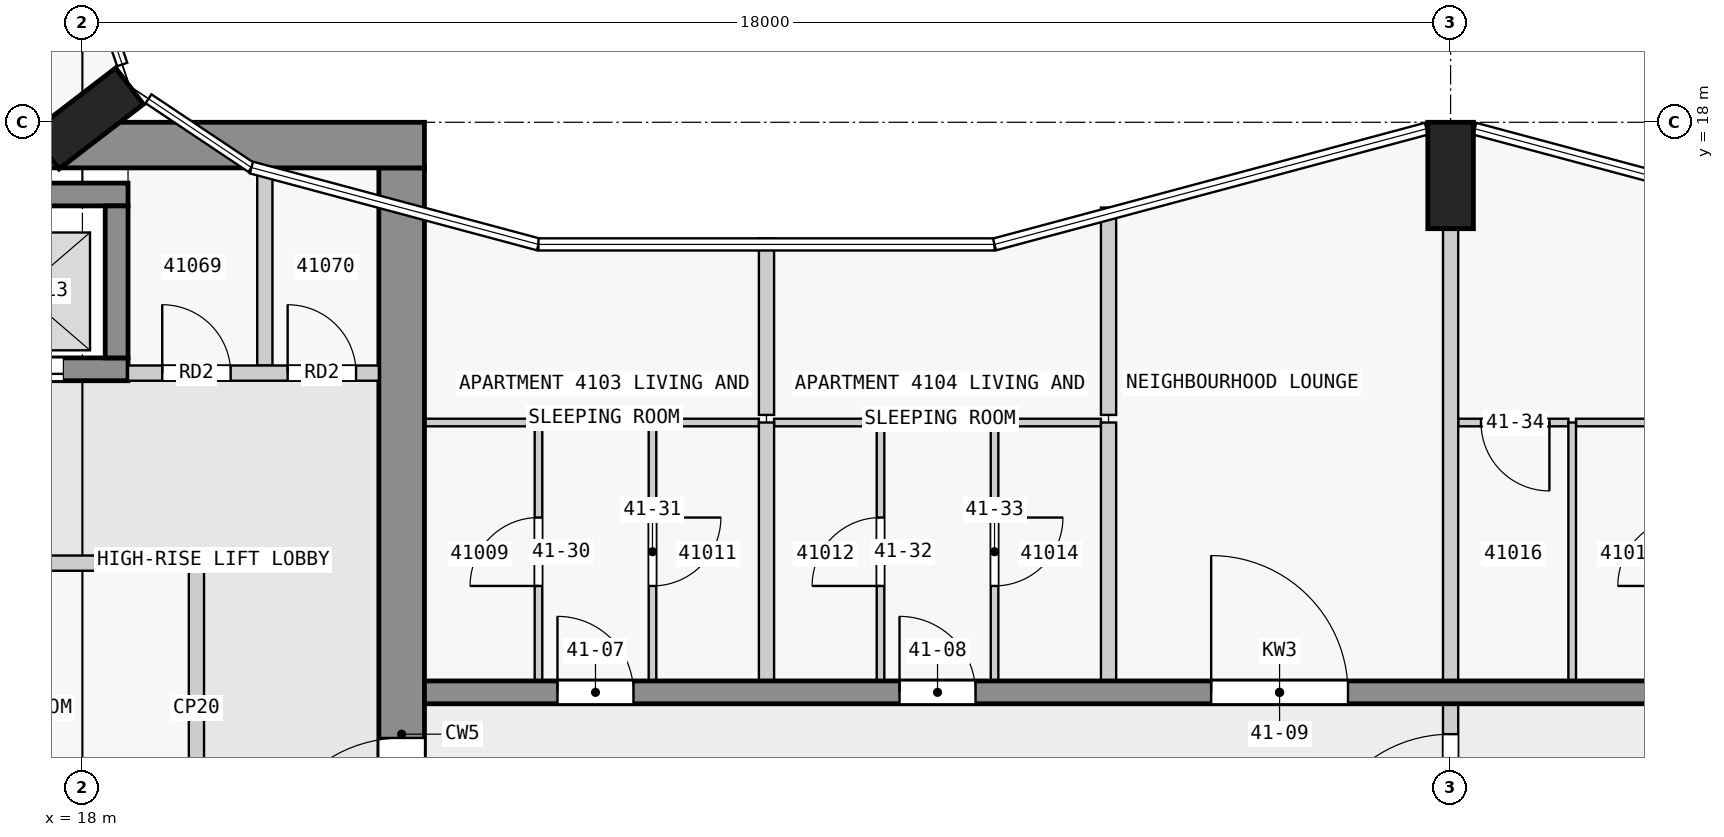
"""IFC4 building model, lengths in metres.
Left out: names, types, materials, properties, quantities, classifications, styles, units other than length and angle.
Written with IfcOpenShell. Run it as: python <this file> out.ifc"""

import sys

from ifc_helpers import new_model, si_unit, direction, frame, frame_2d, origin, origin_2d, place, context, subcontext, project, spatial, rectangle, extrude, element, fill, save


model = new_model("IFC4")
c1 = context("Model", 3, precision=1e-05, world=origin(), true_north=direction((0.0, 1.0)))
c2 = subcontext(c1, "Body", "Model", "MODEL_VIEW")
j1 = project(units=[si_unit("LENGTHUNIT", "METRE"), si_unit("PLANEANGLEUNIT", "RADIAN")], contexts=[c1])
p1 = place(None, origin())
s1 = spatial("IfcSite", under=j1, at=p1, CompositionType="ELEMENT")
p2 = place(p1, origin())
s2 = spatial("IfcBuilding", under=s1, at=p2, CompositionType="ELEMENT")
p3 = place(p2, frame((0.0, 0.0, 160.4)))
s3 = spatial("IfcBuildingStorey", under=s2, at=p3, CompositionType="ELEMENT", Elevation=160.4)
for number, where, z_axis, x_axis in (
    (1, (36.0, 17.3, 0.0), (0.0, 0.0, 1.0), (1.0, 0.0, 0.0)),
    (2, (18.065, 18.05, 0.0), (0.0, 0.0, 1.0), (-0.609, 0.793, 0.0)),
):
    element("IfcColumn", number, at=place(p3, frame(where, z_axis=z_axis, x_axis=x_axis)), inside=s3, PredefinedType="COLUMN", context=c2, shape_type="SweptSolid", body=[
        extrude(rectangle(XDim=0.6, YDim=1.4, at=origin_2d()), origin(), (0.0, 0.0, 1.0), 3.5),
    ])
p4 = place(p3, frame((1.38, 17.7, 0.0), z_axis=(0.0, 0.0, 1.0), x_axis=(1.0, 0.0, 0.0)))
e3 = element("IfcWall", 3, at=p4, inside=s3, PredefinedType="SHEAR", context=c2, shape_type="SweptSolid", body=[
    extrude(rectangle(XDim=21.12, YDim=0.6, at=frame_2d((10.56, 0.0))), origin(), (0.0, 0.0, 1.0), 3.25),
])
p5 = place(p4, frame((6.4, 0.0, 0.0)))
e4 = element("IfcOpeningElement", 4, at=p5, cuts=e3, PredefinedType="OPENING", context=c2, shape_type="SweptSolid", body=[
    extrude(rectangle(XDim=1.8, YDim=2.1, at=frame_2d((0.9, 1.05))), frame((0.0, 0.31, 0.0), z_axis=(0.0, -1.0, 0.0), x_axis=(1.0, 0.0, 0.0)), (0.0, 0.0, 1.0), 0.62),
])
p6 = place(p3, frame((22.2, 2.5, 0.0), z_axis=(0.0, 0.0, 1.0), x_axis=(0.0, 1.0, 0.0)))
e5 = element("IfcWall", 5, at=p6, inside=s3, PredefinedType="SHEAR", context=c2, shape_type="SweptSolid", body=[
    extrude(rectangle(XDim=14.9, YDim=0.6, at=frame_2d((7.45, 0.0))), origin(), (0.0, 0.0, 1.0), 3.25),
])
p7 = place(p6, frame((5.6, 0.0, 0.0)))
e6 = element("IfcOpeningElement", 6, at=p7, cuts=e5, PredefinedType="OPENING", context=c2, shape_type="SweptSolid", body=[
    extrude(rectangle(XDim=1.8, YDim=2.1, at=frame_2d((0.9, 1.05))), frame((0.0, 0.31, 0.0), z_axis=(0.0, -1.0, 0.0), x_axis=(1.0, 0.0, 0.0)), (0.0, 0.0, 1.0), 0.62),
])
p8 = place(p3, frame((10.8, 17.05, 0.0), z_axis=(0.0, 0.0, 1.0), x_axis=(1.0, 0.0, 0.0)))
e7 = element("IfcWall", 7, at=p8, inside=s3, PredefinedType="SHEAR", context=c2, shape_type="SweptSolid", body=[
    extrude(rectangle(XDim=7.8, YDim=0.3, at=frame_2d((3.9, 0.0))), origin(), (0.0, 0.0, 1.0), 3.25),
])
p9 = place(p3, frame((10.8, 14.75, 0.0), z_axis=(0.0, 0.0, 1.0), x_axis=(1.0, 0.0, 0.0)))
e8 = element("IfcWall", 8, at=p9, inside=s3, PredefinedType="SHEAR", context=c2, shape_type="SweptSolid", body=[
    extrude(rectangle(XDim=7.8, YDim=0.3, at=frame_2d((3.9, 0.0))), origin(), (0.0, 0.0, 1.0), 3.25),
])
p10 = place(p9, frame((0.85, 0.0, 0.0)))
e9 = element("IfcOpeningElement", 9, at=p10, cuts=e8, PredefinedType="OPENING", context=c2, shape_type="SweptSolid", body=[
    extrude(rectangle(XDim=1.1, YDim=2.1, at=frame_2d((0.55, 1.05))), frame((0.0, 0.16, 0.0), z_axis=(0.0, -1.0, 0.0), x_axis=(1.0, 0.0, 0.0)), (0.0, 0.0, 1.0), 0.32),
])
p11 = place(p9, frame((3.35, 0.0, 0.0)))
e10 = element("IfcOpeningElement", 10, at=p11, cuts=e8, PredefinedType="OPENING", context=c2, shape_type="SweptSolid", body=[
    extrude(rectangle(XDim=1.1, YDim=2.1, at=frame_2d((0.55, 1.05))), frame((0.0, 0.16, 0.0), z_axis=(0.0, -1.0, 0.0), x_axis=(1.0, 0.0, 0.0)), (0.0, 0.0, 1.0), 0.32),
])
p12 = place(p9, frame((5.85, 0.0, 0.0)))
e11 = element("IfcOpeningElement", 11, at=p12, cuts=e8, PredefinedType="OPENING", context=c2, shape_type="SweptSolid", body=[
    extrude(rectangle(XDim=1.1, YDim=2.1, at=frame_2d((0.55, 1.05))), frame((0.0, 0.16, 0.0), z_axis=(0.0, -1.0, 0.0), x_axis=(1.0, 0.0, 0.0)), (0.0, 0.0, 1.0), 0.32),
])
p13 = place(p3, frame((18.45, 14.9, 0.0), z_axis=(0.0, 0.0, 1.0), x_axis=(0.0, 1.0, 0.0)))
e12 = element("IfcWall", 12, at=p13, inside=s3, PredefinedType="SHEAR", context=c2, shape_type="SweptSolid", body=[
    extrude(rectangle(XDim=2.0, YDim=0.3, at=frame_2d((1.0, 0.0))), origin(), (0.0, 0.0, 1.0), 3.25),
])
p14 = place(p3, frame((22.5, 10.5, 0.0), z_axis=(0.0, 0.0, 1.0), x_axis=(1.0, 0.0, 0.0)))
e13 = element("IfcWall", 13, at=p14, inside=s3, PredefinedType="SHEAR", context=c2, shape_type="SweptSolid", body=[
    extrude(rectangle(XDim=22.5, YDim=0.3, at=frame_2d((11.25, 0.0))), origin(), (0.0, 0.0, 1.0), 3.25),
])
p15 = place(p14, frame((1.75, 0.0, 0.0)))
e14 = element("IfcOpeningElement", 14, at=p15, cuts=e13, PredefinedType="OPENING", context=c2, shape_type="SweptSolid", body=[
    extrude(rectangle(XDim=1.0, YDim=2.1, at=frame_2d((0.5, 1.05))), frame((0.0, 0.16, 0.0), z_axis=(0.0, -1.0, 0.0), x_axis=(1.0, 0.0, 0.0)), (0.0, 0.0, 1.0), 0.32),
])
p16 = place(p14, frame((6.25, 0.0, 0.0)))
e15 = element("IfcOpeningElement", 15, at=p16, cuts=e13, PredefinedType="OPENING", context=c2, shape_type="SweptSolid", body=[
    extrude(rectangle(XDim=1.0, YDim=2.1, at=frame_2d((0.5, 1.05))), frame((0.0, 0.16, 0.0), z_axis=(0.0, -1.0, 0.0), x_axis=(1.0, 0.0, 0.0)), (0.0, 0.0, 1.0), 0.32),
])
p17 = place(p14, frame((10.35, 0.0, 0.0)))
e16 = element("IfcOpeningElement", 16, at=p17, cuts=e13, PredefinedType="OPENING", context=c2, shape_type="SweptSolid", body=[
    extrude(rectangle(XDim=1.8, YDim=2.1, at=frame_2d((0.9, 1.05))), frame((0.0, 0.16, 0.0), z_axis=(0.0, -1.0, 0.0), x_axis=(1.0, 0.0, 0.0)), (0.0, 0.0, 1.0), 0.32),
])
p18 = place(p14, frame((16.85, 0.0, 0.0)))
e17 = element("IfcOpeningElement", 17, at=p18, cuts=e13, PredefinedType="OPENING", context=c2, shape_type="SweptSolid", body=[
    extrude(rectangle(XDim=1.0, YDim=2.1, at=frame_2d((0.5, 1.05))), frame((0.0, 0.16, 0.0), z_axis=(0.0, -1.0, 0.0), x_axis=(1.0, 0.0, 0.0)), (0.0, 0.0, 1.0), 0.32),
])
p19 = place(p3, frame((19.5, 8.4, 0.0), z_axis=(0.0, 0.0, 1.0), x_axis=(0.0, 1.0, 0.0)))
e18 = element("IfcWall", 18, at=p19, inside=s3, PredefinedType="PARTITIONING", context=c2, shape_type="SweptSolid", body=[
    extrude(rectangle(XDim=3.8, YDim=0.2, at=frame_2d((1.9, 0.0))), origin(), (0.0, 0.0, 1.0), 3.25),
])
p20 = place(p3, frame((10.9, 12.2, 0.0), z_axis=(0.0, 0.0, 1.0), x_axis=(1.0, 0.0, 0.0)))
e19 = element("IfcWall", 19, at=p20, inside=s3, PredefinedType="PARTITIONING", context=c2, shape_type="SweptSolid", body=[
    extrude(rectangle(XDim=8.5, YDim=0.2, at=frame_2d((4.25, 0.0))), origin(), (0.0, 0.0, 1.0), 3.25),
])
p21 = place(p20, frame((1.4, 0.0, 0.0)))
e20 = element("IfcOpeningElement", 20, at=p21, cuts=e19, PredefinedType="OPENING", context=c2, shape_type="SweptSolid", body=[
    extrude(rectangle(XDim=0.9, YDim=2.1, at=frame_2d((0.45, 1.05))), frame((0.0, 0.11, 0.0), z_axis=(0.0, -1.0, 0.0), x_axis=(1.0, 0.0, 0.0)), (0.0, 0.0, 1.0), 0.22),
])
p22 = place(p20, frame((5.75, 0.0, 0.0)))
e21 = element("IfcOpeningElement", 21, at=p22, cuts=e19, PredefinedType="OPENING", context=c2, shape_type="SweptSolid", body=[
    extrude(rectangle(XDim=0.9, YDim=2.1, at=frame_2d((0.45, 1.05))), frame((0.0, 0.11, 0.0), z_axis=(0.0, -1.0, 0.0), x_axis=(1.0, 0.0, 0.0)), (0.0, 0.0, 1.0), 0.22),
])
p23 = place(p3, frame((18.6, 14.7, 0.0), z_axis=(0.0, 0.0, 1.0), x_axis=(1.0, 0.0, 0.0)))
e22 = element("IfcWall", 22, at=p23, inside=s3, PredefinedType="PARTITIONING", context=c2, shape_type="SweptSolid", body=[
    extrude(rectangle(XDim=3.3, YDim=0.2, at=frame_2d((1.65, 0.0))), origin(), (0.0, 0.0, 1.0), 3.25),
])
p24 = place(p23, frame((0.45, 0.0, 0.0)))
e23 = element("IfcOpeningElement", 23, at=p24, cuts=e22, PredefinedType="OPENING", context=c2, shape_type="SweptSolid", body=[
    extrude(rectangle(XDim=0.9, YDim=2.1, at=frame_2d((0.45, 1.05))), frame((0.0, 0.11, 0.0), z_axis=(0.0, -1.0, 0.0), x_axis=(1.0, 0.0, 0.0)), (0.0, 0.0, 1.0), 0.22),
])
p25 = place(p23, frame((2.1, 0.0, 0.0)))
e24 = element("IfcOpeningElement", 24, at=p25, cuts=e22, PredefinedType="OPENING", context=c2, shape_type="SweptSolid", body=[
    extrude(rectangle(XDim=0.9, YDim=2.1, at=frame_2d((0.45, 1.05))), frame((0.0, 0.11, 0.0), z_axis=(0.0, -1.0, 0.0), x_axis=(1.0, 0.0, 0.0)), (0.0, 0.0, 1.0), 0.22),
])
p26 = place(p3, frame((20.4, 14.8, 0.0), z_axis=(0.0, 0.0, 1.0), x_axis=(0.0, 1.0, 0.0)))
e25 = element("IfcWall", 25, at=p26, inside=s3, PredefinedType="PARTITIONING", context=c2, shape_type="SweptSolid", body=[
    extrude(rectangle(XDim=2.6, YDim=0.2, at=frame_2d((1.3, 0.0))), origin(), (0.0, 0.0, 1.0), 3.25),
])
p27 = place(p3, frame((23.95, 14.05, 0.0), z_axis=(0.0, 0.0, 1.0), x_axis=(-1.0, 0.0, 0.0)))
e26 = element("IfcWall", 26, at=p27, inside=s3, PredefinedType="PARTITIONING", context=c2, shape_type="SweptSolid", body=[
    extrude(rectangle(XDim=1.45, YDim=0.1, at=frame_2d((0.725, 0.0))), origin(), (0.0, 0.0, 1.0), 3.25),
])
for number, where, z_axis, x_axis in (
    (27, (26.9, 14.05, 0.0), (0.0, 0.0, 1.0), (-1.0, 0.0, 0.0)),
    (28, (28.45, 14.05, 0.0), (0.0, 0.0, 1.0), (-1.0, 0.0, 0.0)),
    (29, (31.4, 14.05, 0.0), (0.0, 0.0, 1.0), (-1.0, 0.0, 0.0)),
):
    element("IfcWall", number, at=place(p3, frame(where, z_axis=z_axis, x_axis=x_axis)), inside=s3, PredefinedType="PARTITIONING", context=c2, shape_type="SweptSolid", body=[
        extrude(rectangle(XDim=1.35, YDim=0.1, at=frame_2d((0.675, 0.0))), origin(), (0.0, 0.0, 1.0), 3.25),
    ])
p28 = place(p3, frame((37.55, 14.05, 0.0), z_axis=(0.0, 0.0, 1.0), x_axis=(-1.0, 0.0, 0.0)))
e30 = element("IfcWall", 30, at=p28, inside=s3, PredefinedType="PARTITIONING", context=c2, shape_type="SweptSolid", body=[
    extrude(rectangle(XDim=1.45, YDim=0.1, at=frame_2d((0.725, 0.0))), origin(), (0.0, 0.0, 1.0), 3.25),
])
p29 = place(p28, frame((0.25, 0.0, 0.0)))
e31 = element("IfcOpeningElement", 31, at=p29, cuts=e30, PredefinedType="OPENING", context=c2, shape_type="SweptSolid", body=[
    extrude(rectangle(XDim=0.9, YDim=2.1, at=frame_2d((0.45, 1.05))), frame((0.0, 0.06, 0.0), z_axis=(0.0, -1.0, 0.0), x_axis=(1.0, 0.0, 0.0)), (0.0, 0.0, 1.0), 0.12),
])
p30 = place(p3, frame((39.05, 14.05, 0.0), z_axis=(0.0, 0.0, 1.0), x_axis=(-1.0, 0.0, 0.0)))
e32 = element("IfcWall", 32, at=p30, inside=s3, PredefinedType="PARTITIONING", context=c2, shape_type="SweptSolid", body=[
    extrude(rectangle(XDim=1.4, YDim=0.1, at=frame_2d((0.7, 0.0))), origin(), (0.0, 0.0, 1.0), 3.25),
])
p31 = place(p3, frame((24.0, 10.65, 0.0), z_axis=(0.0, 0.0, 1.0), x_axis=(0.0, 1.0, 0.0)))
e33 = element("IfcWall", 33, at=p31, inside=s3, PredefinedType="PARTITIONING", context=c2, shape_type="SweptSolid", body=[
    extrude(rectangle(XDim=3.4, YDim=0.1, at=frame_2d((1.7, 0.0))), origin(), (0.0, 0.0, 1.0), 3.25),
])
p32 = place(p31, frame((1.25, 0.0, 0.0)))
e34 = element("IfcOpeningElement", 34, at=p32, cuts=e33, PredefinedType="OPENING", context=c2, shape_type="SweptSolid", body=[
    extrude(rectangle(XDim=0.9, YDim=2.1, at=frame_2d((0.45, 1.05))), frame((0.0, 0.06, 0.0), z_axis=(0.0, -1.0, 0.0), x_axis=(1.0, 0.0, 0.0)), (0.0, 0.0, 1.0), 0.12),
])
p33 = place(p3, frame((25.5, 14.05, 0.0), z_axis=(0.0, 0.0, 1.0), x_axis=(0.0, -1.0, 0.0)))
e35 = element("IfcWall", 35, at=p33, inside=s3, PredefinedType="PARTITIONING", context=c2, shape_type="SweptSolid", body=[
    extrude(rectangle(XDim=3.4, YDim=0.1, at=frame_2d((1.7, 0.0))), origin(), (0.0, 0.0, 1.0), 3.25),
])
p34 = place(p33, frame((1.25, 0.0, 0.0)))
e36 = element("IfcOpeningElement", 36, at=p34, cuts=e35, PredefinedType="OPENING", context=c2, shape_type="SweptSolid", body=[
    extrude(rectangle(XDim=0.9, YDim=2.1, at=frame_2d((0.45, 1.05))), frame((0.0, 0.06, 0.0), z_axis=(0.0, -1.0, 0.0), x_axis=(1.0, 0.0, 0.0)), (0.0, 0.0, 1.0), 0.12),
])
p35 = place(p3, frame((27.0, 16.473, 0.0), z_axis=(0.0, 0.0, 1.0), x_axis=(0.0, -1.0, 0.0)))
e37 = element("IfcWall", 37, at=p35, inside=s3, PredefinedType="PARTITIONING", context=c2, shape_type="SweptSolid", body=[
    extrude(rectangle(XDim=2.323, YDim=0.2, at=frame_2d((1.162, 0.0))), origin(), (0.0, 0.0, 1.0), 3.25),
])
p36 = place(p3, frame((27.0, 10.65, 0.0), z_axis=(0.0, 0.0, 1.0), x_axis=(0.0, 1.0, 0.0)))
e38 = element("IfcWall", 38, at=p36, inside=s3, PredefinedType="PARTITIONING", context=c2, shape_type="SweptSolid", body=[
    extrude(rectangle(XDim=3.4, YDim=0.2, at=frame_2d((1.7, 0.0))), origin(), (0.0, 0.0, 1.0), 3.25),
])
p37 = place(p3, frame((28.5, 10.65, 0.0), z_axis=(0.0, 0.0, 1.0), x_axis=(0.0, 1.0, 0.0)))
e39 = element("IfcWall", 39, at=p37, inside=s3, PredefinedType="PARTITIONING", context=c2, shape_type="SweptSolid", body=[
    extrude(rectangle(XDim=3.4, YDim=0.1, at=frame_2d((1.7, 0.0))), origin(), (0.0, 0.0, 1.0), 3.25),
])
p38 = place(p37, frame((1.25, 0.0, 0.0)))
e40 = element("IfcOpeningElement", 40, at=p38, cuts=e39, PredefinedType="OPENING", context=c2, shape_type="SweptSolid", body=[
    extrude(rectangle(XDim=0.9, YDim=2.1, at=frame_2d((0.45, 1.05))), frame((0.0, 0.06, 0.0), z_axis=(0.0, -1.0, 0.0), x_axis=(1.0, 0.0, 0.0)), (0.0, 0.0, 1.0), 0.12),
])
p39 = place(p3, frame((30.0, 14.05, 0.0), z_axis=(0.0, 0.0, 1.0), x_axis=(0.0, -1.0, 0.0)))
e41 = element("IfcWall", 41, at=p39, inside=s3, PredefinedType="PARTITIONING", context=c2, shape_type="SweptSolid", body=[
    extrude(rectangle(XDim=3.4, YDim=0.1, at=frame_2d((1.7, 0.0))), origin(), (0.0, 0.0, 1.0), 3.25),
])
p40 = place(p39, frame((1.25, 0.0, 0.0)))
e42 = element("IfcOpeningElement", 42, at=p40, cuts=e41, PredefinedType="OPENING", context=c2, shape_type="SweptSolid", body=[
    extrude(rectangle(XDim=0.9, YDim=2.1, at=frame_2d((0.45, 1.05))), frame((0.0, 0.06, 0.0), z_axis=(0.0, -1.0, 0.0), x_axis=(1.0, 0.0, 0.0)), (0.0, 0.0, 1.0), 0.12),
])
p41 = place(p3, frame((31.5, 16.878, 0.0), z_axis=(0.0, 0.0, 1.0), x_axis=(0.0, -1.0, 0.0)))
e43 = element("IfcWall", 43, at=p41, inside=s3, PredefinedType="PARTITIONING", context=c2, shape_type="SweptSolid", body=[
    extrude(rectangle(XDim=2.728, YDim=0.2, at=frame_2d((1.364, 0.0))), origin(), (0.0, 0.0, 1.0), 3.25),
])
p42 = place(p3, frame((31.5, 10.65, 0.0), z_axis=(0.0, 0.0, 1.0), x_axis=(0.0, 1.0, 0.0)))
e44 = element("IfcWall", 44, at=p42, inside=s3, PredefinedType="PARTITIONING", context=c2, shape_type="SweptSolid", body=[
    extrude(rectangle(XDim=3.4, YDim=0.2, at=frame_2d((1.7, 0.0))), origin(), (0.0, 0.0, 1.0), 3.25),
])
p43 = place(p3, frame((36.0, 10.65, 0.0), z_axis=(0.0, 0.0, 1.0), x_axis=(0.0, 1.0, 0.0)))
e45 = element("IfcWall", 45, at=p43, inside=s3, PredefinedType="PARTITIONING", context=c2, shape_type="SweptSolid", body=[
    extrude(rectangle(XDim=5.95, YDim=0.2, at=frame_2d((2.975, 0.0))), origin(), (0.0, 0.0, 1.0), 3.25),
])
p44 = place(p3, frame((37.6, 10.65, 0.0), z_axis=(0.0, 0.0, 1.0), x_axis=(0.0, 1.0, 0.0)))
e46 = element("IfcWall", 46, at=p44, inside=s3, PredefinedType="PARTITIONING", context=c2, shape_type="SweptSolid", body=[
    extrude(rectangle(XDim=3.4, YDim=0.1, at=frame_2d((1.7, 0.0))), origin(), (0.0, 0.0, 1.0), 3.25),
])
p45 = place(p3, frame((36.0, 7.45, 0.0), z_axis=(0.0, 0.0, 1.0), x_axis=(0.0, 1.0, 0.0)))
e47 = element("IfcWall", 47, at=p45, inside=s3, PredefinedType="PARTITIONING", context=c2, shape_type="SweptSolid", body=[
    extrude(rectangle(XDim=3.1, YDim=0.2, at=frame_2d((1.55, 0.0))), origin(), (0.0, 0.0, 1.0), 3.25),
])
p46 = place(p45, frame((0.7, 0.0, 0.0)))
e48 = element("IfcOpeningElement", 48, at=p46, cuts=e47, PredefinedType="OPENING", context=c2, shape_type="SweptSolid", body=[
    extrude(rectangle(XDim=1.8, YDim=2.1, at=frame_2d((0.9, 1.05))), frame((0.0, 0.11, 0.0), z_axis=(0.0, -1.0, 0.0), x_axis=(1.0, 0.0, 0.0)), (0.0, 0.0, 1.0), 0.22),
])
p47 = place(p12, origin())
e49 = element("IfcDoor", 49, at=p47, inside=s3, OperationType="DOUBLE_DOOR_SLIDING", PredefinedType="DOOR", context=c2, shape_type="SweptSolid", body=[
    extrude(rectangle(XDim=1.1, YDim=2.1, at=frame_2d((0.55, 1.05))), frame((0.0, 0.025, 0.0), z_axis=(0.0, -1.0, 0.0), x_axis=(1.0, 0.0, 0.0)), (0.0, 0.0, 1.0), 0.05),
])
fill(e11, e49)
p48 = place(p7, origin())
e50 = element("IfcDoor", 50, at=p48, inside=s3, OperationType="DOUBLE_DOOR_SINGLE_SWING", PredefinedType="DOOR", context=c2, shape_type="SweptSolid", body=[
    extrude(rectangle(XDim=1.8, YDim=2.1, at=frame_2d((0.9, 1.05))), frame((0.0, 0.025, 0.0), z_axis=(0.0, -1.0, 0.0), x_axis=(1.0, 0.0, 0.0)), (0.0, 0.0, 1.0), 0.05),
])
fill(e6, e50)
p49 = place(p24, origin())
e51 = element("IfcDoor", 51, at=p49, inside=s3, OperationType="SINGLE_SWING_LEFT", PredefinedType="DOOR", context=c2, shape_type="SweptSolid", body=[
    extrude(rectangle(XDim=0.9, YDim=2.1, at=frame_2d((0.45, 1.05))), frame((0.0, 0.025, 0.0), z_axis=(0.0, -1.0, 0.0), x_axis=(1.0, 0.0, 0.0)), (0.0, 0.0, 1.0), 0.05),
])
fill(e23, e51)
p50 = place(p25, origin())
e52 = element("IfcDoor", 52, at=p50, inside=s3, OperationType="SINGLE_SWING_LEFT", PredefinedType="DOOR", context=c2, shape_type="SweptSolid", body=[
    extrude(rectangle(XDim=0.9, YDim=2.1, at=frame_2d((0.45, 1.05))), frame((0.0, 0.025, 0.0), z_axis=(0.0, -1.0, 0.0), x_axis=(1.0, 0.0, 0.0)), (0.0, 0.0, 1.0), 0.05),
])
fill(e24, e52)
p51 = place(p15, origin())
e53 = element("IfcDoor", 53, at=p51, inside=s3, OperationType="SINGLE_SWING_LEFT", PredefinedType="DOOR", context=c2, shape_type="SweptSolid", body=[
    extrude(rectangle(XDim=1.0, YDim=2.1, at=frame_2d((0.5, 1.05))), frame((0.0, 0.025, 0.0), z_axis=(0.0, -1.0, 0.0), x_axis=(1.0, 0.0, 0.0)), (0.0, 0.0, 1.0), 0.05),
])
fill(e14, e53)
p52 = place(p16, origin())
e54 = element("IfcDoor", 54, at=p52, inside=s3, OperationType="SINGLE_SWING_LEFT", PredefinedType="DOOR", context=c2, shape_type="SweptSolid", body=[
    extrude(rectangle(XDim=1.0, YDim=2.1, at=frame_2d((0.5, 1.05))), frame((0.0, 0.025, 0.0), z_axis=(0.0, -1.0, 0.0), x_axis=(1.0, 0.0, 0.0)), (0.0, 0.0, 1.0), 0.05),
])
fill(e15, e54)
p53 = place(p17, origin())
e55 = element("IfcDoor", 55, at=p53, inside=s3, OperationType="SINGLE_SWING_LEFT", PredefinedType="DOOR", context=c2, shape_type="SweptSolid", body=[
    extrude(rectangle(XDim=1.8, YDim=2.1, at=frame_2d((0.9, 1.05))), frame((0.0, 0.025, 0.0), z_axis=(0.0, -1.0, 0.0), x_axis=(1.0, 0.0, 0.0)), (0.0, 0.0, 1.0), 0.05),
])
fill(e16, e55)
p54 = place(p46, origin())
e56 = element("IfcDoor", 56, at=p54, inside=s3, OperationType="SINGLE_SWING_RIGHT", PredefinedType="DOOR", context=c2, shape_type="SweptSolid", body=[
    extrude(rectangle(XDim=1.8, YDim=2.1, at=frame_2d((0.9, 1.05))), frame((0.0, 0.025, 0.0), z_axis=(0.0, -1.0, 0.0), x_axis=(1.0, 0.0, 0.0)), (0.0, 0.0, 1.0), 0.05),
])
fill(e48, e56)
p55 = place(p32, origin())
e57 = element("IfcDoor", 57, at=p55, inside=s3, OperationType="SINGLE_SWING_LEFT", PredefinedType="DOOR", context=c2, shape_type="SweptSolid", body=[
    extrude(rectangle(XDim=0.9, YDim=2.1, at=frame_2d((0.45, 1.05))), frame((0.0, 0.025, 0.0), z_axis=(0.0, -1.0, 0.0), x_axis=(1.0, 0.0, 0.0)), (0.0, 0.0, 1.0), 0.05),
])
fill(e34, e57)
p56 = place(p34, origin())
e58 = element("IfcDoor", 58, at=p56, inside=s3, OperationType="SINGLE_SWING_LEFT", PredefinedType="DOOR", context=c2, shape_type="SweptSolid", body=[
    extrude(rectangle(XDim=0.9, YDim=2.1, at=frame_2d((0.45, 1.05))), frame((0.0, 0.025, 0.0), z_axis=(0.0, -1.0, 0.0), x_axis=(1.0, 0.0, 0.0)), (0.0, 0.0, 1.0), 0.05),
])
fill(e36, e58)
p57 = place(p38, origin())
e59 = element("IfcDoor", 59, at=p57, inside=s3, OperationType="SINGLE_SWING_LEFT", PredefinedType="DOOR", context=c2, shape_type="SweptSolid", body=[
    extrude(rectangle(XDim=0.9, YDim=2.1, at=frame_2d((0.45, 1.05))), frame((0.0, 0.025, 0.0), z_axis=(0.0, -1.0, 0.0), x_axis=(1.0, 0.0, 0.0)), (0.0, 0.0, 1.0), 0.05),
])
fill(e40, e59)
p58 = place(p40, origin())
e60 = element("IfcDoor", 60, at=p58, inside=s3, OperationType="SINGLE_SWING_LEFT", PredefinedType="DOOR", context=c2, shape_type="SweptSolid", body=[
    extrude(rectangle(XDim=0.9, YDim=2.1, at=frame_2d((0.45, 1.05))), frame((0.0, 0.025, 0.0), z_axis=(0.0, -1.0, 0.0), x_axis=(1.0, 0.0, 0.0)), (0.0, 0.0, 1.0), 0.05),
])
fill(e42, e60)
p59 = place(p29, origin())
e61 = element("IfcDoor", 61, at=p59, inside=s3, OperationType="SINGLE_SWING_LEFT", PredefinedType="DOOR", context=c2, shape_type="SweptSolid", body=[
    extrude(rectangle(XDim=0.9, YDim=2.1, at=frame_2d((0.45, 1.05))), frame((0.0, 0.025, 0.0), z_axis=(0.0, -1.0, 0.0), x_axis=(1.0, 0.0, 0.0)), (0.0, 0.0, 1.0), 0.05),
])
fill(e31, e61)
save(model, sys.argv[1])
